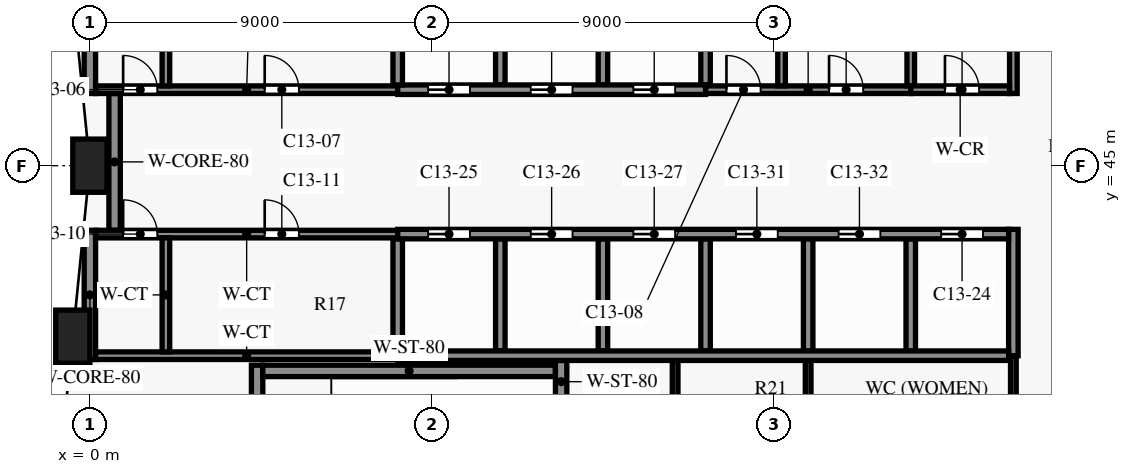
"""IFC4 building model, lengths in metres.
Left out: names, types, materials, properties, quantities, classifications, styles, units other than length and angle.
Written with IfcOpenShell. Run it as: python <this file> out.ifc"""

import sys

from ifc_helpers import new_model, si_unit, direction, frame, frame_2d, origin, origin_2d, place, context, subcontext, project, spatial, rectangle, extrude, element, fill, save


model = new_model("IFC4")
c1 = context("Model", 3, precision=1e-05, world=origin(), true_north=direction((0.0, 1.0)))
c2 = subcontext(c1, "Body", "Model", "MODEL_VIEW")
j1 = project(units=[si_unit("LENGTHUNIT", "METRE"), si_unit("PLANEANGLEUNIT", "RADIAN")], contexts=[c1])
p1 = place(None, origin())
s1 = spatial("IfcSite", under=j1, at=p1, CompositionType="ELEMENT")
p2 = place(p1, origin())
s2 = spatial("IfcBuilding", under=s1, at=p2, CompositionType="ELEMENT")
p3 = place(p2, frame((0.0, 0.0, 84.3)))
s3 = spatial("IfcBuildingStorey", under=s2, at=p3, CompositionType="ELEMENT", Elevation=84.3)
for number, where, z_axis, x_axis in (
    (1, (0.0, 45.0, 0.0), (0.0, 0.0, 1.0), (0.0, -1.0, 0.0)),
    (2, (-0.45, 40.5, 0.0), (0.0, 0.0, 1.0), (-0.1, -0.995, 0.0)),
):
    element("IfcColumn", number, at=place(p3, frame(where, z_axis=z_axis, x_axis=x_axis)), inside=s3, PredefinedType="COLUMN", context=c2, shape_type="SweptSolid", body=[
        extrude(rectangle(XDim=0.9, YDim=1.4, at=origin_2d()), origin(), (0.0, 0.0, 1.0), 4.2),
    ])
p4 = place(p3, frame((4.55, 39.6, 0.0), z_axis=(0.0, 0.0, 1.0), x_axis=(1.0, 0.0, 0.0)))
e3 = element("IfcWall", 3, at=p4, inside=s3, PredefinedType="SHEAR", context=c2, shape_type="SweptSolid", body=[
    extrude(rectangle(XDim=7.7, YDim=0.3, at=frame_2d((3.85, 0.0))), origin(), (0.0, 0.0, 1.0), 3.9),
])
p5 = place(p3, frame((0.15, 40.0, 0.0), z_axis=(0.0, 0.0, 1.0), x_axis=(1.0, 0.0, 0.0)))
e4 = element("IfcWall", 4, at=p5, inside=s3, PredefinedType="PARTITIONING", context=c2, shape_type="SweptSolid", body=[
    extrude(rectangle(XDim=7.95, YDim=0.2, at=frame_2d((3.975, 0.0))), origin(), (0.0, 0.0, 1.0), 3.9),
])
p6 = place(p3, frame((8.1, 40.0, 0.0), z_axis=(0.0, 0.0, 1.0), x_axis=(1.0, 0.0, 0.0)))
e5 = element("IfcWall", 5, at=p6, inside=s3, PredefinedType="SHEAR", context=c2, shape_type="SweptSolid", body=[
    extrude(rectangle(XDim=16.075, YDim=0.25, at=frame_2d((8.038, 0.0))), origin(), (0.0, 0.0, 1.0), 3.9),
])
p7 = place(p3, frame((0.15, 43.2, 0.0), z_axis=(0.0, 0.0, 1.0), x_axis=(1.0, 0.0, 0.0)))
e6 = element("IfcWall", 6, at=p7, inside=s3, PredefinedType="PARTITIONING", context=c2, shape_type="SweptSolid", body=[
    extrude(rectangle(XDim=7.95, YDim=0.2, at=frame_2d((3.975, 0.0))), origin(), (0.0, 0.0, 1.0), 3.9),
])
p8 = place(p7, frame((0.725, 0.0, 0.0)))
e7 = element("IfcOpeningElement", 7, at=p8, cuts=e6, PredefinedType="OPENING", context=c2, shape_type="SweptSolid", body=[
    extrude(rectangle(XDim=0.9, YDim=2.1, at=frame_2d((0.45, 1.05))), frame((0.0, 0.11, 0.0), z_axis=(0.0, -1.0, 0.0), x_axis=(1.0, 0.0, 0.0)), (0.0, 0.0, 1.0), 0.22),
])
p9 = place(p7, frame((4.45, 0.0, 0.0)))
e8 = element("IfcOpeningElement", 8, at=p9, cuts=e6, PredefinedType="OPENING", context=c2, shape_type="SweptSolid", body=[
    extrude(rectangle(XDim=0.9, YDim=2.1, at=frame_2d((0.45, 1.05))), frame((0.0, 0.11, 0.0), z_axis=(0.0, -1.0, 0.0), x_axis=(1.0, 0.0, 0.0)), (0.0, 0.0, 1.0), 0.22),
])
p10 = place(p3, frame((8.1, 43.2, 0.0), z_axis=(0.0, 0.0, 1.0), x_axis=(1.0, 0.0, 0.0)))
e9 = element("IfcWall", 9, at=p10, inside=s3, PredefinedType="SHEAR", context=c2, shape_type="SweptSolid", body=[
    extrude(rectangle(XDim=16.075, YDim=0.25, at=frame_2d((8.038, 0.0))), origin(), (0.0, 0.0, 1.0), 3.9),
])
p11 = place(p10, frame((14.3, 0.0, 0.0)))
e10 = element("IfcOpeningElement", 10, at=p11, cuts=e9, PredefinedType="OPENING", context=c2, shape_type="SweptSolid", body=[
    extrude(rectangle(XDim=1.1, YDim=2.1, at=frame_2d((0.55, 1.05))), frame((0.0, 0.135, 0.0), z_axis=(0.0, -1.0, 0.0), x_axis=(1.0, 0.0, 0.0)), (0.0, 0.0, 1.0), 0.27),
])
p12 = place(p10, frame((0.8, 0.0, 0.0)))
e11 = element("IfcOpeningElement", 11, at=p12, cuts=e9, PredefinedType="OPENING", context=c2, shape_type="SweptSolid", body=[
    extrude(rectangle(XDim=1.1, YDim=2.1, at=frame_2d((0.55, 1.05))), frame((0.0, 0.135, 0.0), z_axis=(0.0, -1.0, 0.0), x_axis=(1.0, 0.0, 0.0)), (0.0, 0.0, 1.0), 0.27),
])
p13 = place(p10, frame((3.5, 0.0, 0.0)))
e12 = element("IfcOpeningElement", 12, at=p13, cuts=e9, PredefinedType="OPENING", context=c2, shape_type="SweptSolid", body=[
    extrude(rectangle(XDim=1.1, YDim=2.1, at=frame_2d((0.55, 1.05))), frame((0.0, 0.135, 0.0), z_axis=(0.0, -1.0, 0.0), x_axis=(1.0, 0.0, 0.0)), (0.0, 0.0, 1.0), 0.27),
])
p14 = place(p10, frame((6.2, 0.0, 0.0)))
e13 = element("IfcOpeningElement", 13, at=p14, cuts=e9, PredefinedType="OPENING", context=c2, shape_type="SweptSolid", body=[
    extrude(rectangle(XDim=1.1, YDim=2.1, at=frame_2d((0.55, 1.05))), frame((0.0, 0.135, 0.0), z_axis=(0.0, -1.0, 0.0), x_axis=(1.0, 0.0, 0.0)), (0.0, 0.0, 1.0), 0.27),
])
p15 = place(p10, frame((8.9, 0.0, 0.0)))
e14 = element("IfcOpeningElement", 14, at=p15, cuts=e9, PredefinedType="OPENING", context=c2, shape_type="SweptSolid", body=[
    extrude(rectangle(XDim=1.1, YDim=2.1, at=frame_2d((0.55, 1.05))), frame((0.0, 0.135, 0.0), z_axis=(0.0, -1.0, 0.0), x_axis=(1.0, 0.0, 0.0)), (0.0, 0.0, 1.0), 0.27),
])
p16 = place(p10, frame((11.6, 0.0, 0.0)))
e15 = element("IfcOpeningElement", 15, at=p16, cuts=e9, PredefinedType="OPENING", context=c2, shape_type="SweptSolid", body=[
    extrude(rectangle(XDim=1.1, YDim=2.1, at=frame_2d((0.55, 1.05))), frame((0.0, 0.135, 0.0), z_axis=(0.0, -1.0, 0.0), x_axis=(1.0, 0.0, 0.0)), (0.0, 0.0, 1.0), 0.27),
])
p17 = place(p3, frame((0.15, 47.0, 0.0), z_axis=(0.0, 0.0, 1.0), x_axis=(1.0, 0.0, 0.0)))
e16 = element("IfcWall", 16, at=p17, inside=s3, PredefinedType="PARTITIONING", context=c2, shape_type="SweptSolid", body=[
    extrude(rectangle(XDim=7.95, YDim=0.2, at=frame_2d((3.975, 0.0))), origin(), (0.0, 0.0, 1.0), 3.9),
])
p18 = place(p17, frame((0.725, 0.0, 0.0)))
e17 = element("IfcOpeningElement", 17, at=p18, cuts=e16, PredefinedType="OPENING", context=c2, shape_type="SweptSolid", body=[
    extrude(rectangle(XDim=0.9, YDim=2.1, at=frame_2d((0.45, 1.05))), frame((0.0, 0.11, 0.0), z_axis=(0.0, -1.0, 0.0), x_axis=(1.0, 0.0, 0.0)), (0.0, 0.0, 1.0), 0.22),
])
p19 = place(p17, frame((4.45, 0.0, 0.0)))
e18 = element("IfcOpeningElement", 18, at=p19, cuts=e16, PredefinedType="OPENING", context=c2, shape_type="SweptSolid", body=[
    extrude(rectangle(XDim=0.9, YDim=2.1, at=frame_2d((0.45, 1.05))), frame((0.0, 0.11, 0.0), z_axis=(0.0, -1.0, 0.0), x_axis=(1.0, 0.0, 0.0)), (0.0, 0.0, 1.0), 0.22),
])
p20 = place(p3, frame((16.2, 47.0, 0.0), z_axis=(0.0, 0.0, 1.0), x_axis=(1.0, 0.0, 0.0)))
e19 = element("IfcWall", 19, at=p20, inside=s3, PredefinedType="PARTITIONING", context=c2, shape_type="SweptSolid", body=[
    extrude(rectangle(XDim=5.4, YDim=0.2, at=frame_2d((2.7, 0.0))), origin(), (0.0, 0.0, 1.0), 3.9),
])
p21 = place(p20, frame((0.55, 0.0, 0.0)))
e20 = element("IfcOpeningElement", 20, at=p21, cuts=e19, PredefinedType="OPENING", context=c2, shape_type="SweptSolid", body=[
    extrude(rectangle(XDim=0.9, YDim=2.1, at=frame_2d((0.45, 1.05))), frame((0.0, 0.11, 0.0), z_axis=(0.0, -1.0, 0.0), x_axis=(1.0, 0.0, 0.0)), (0.0, 0.0, 1.0), 0.22),
])
p22 = place(p20, frame((3.25, 0.0, 0.0)))
e21 = element("IfcOpeningElement", 21, at=p22, cuts=e19, PredefinedType="OPENING", context=c2, shape_type="SweptSolid", body=[
    extrude(rectangle(XDim=0.9, YDim=2.1, at=frame_2d((0.45, 1.05))), frame((0.0, 0.11, 0.0), z_axis=(0.0, -1.0, 0.0), x_axis=(1.0, 0.0, 0.0)), (0.0, 0.0, 1.0), 0.22),
])
p23 = place(p3, frame((21.6, 47.0, 0.0), z_axis=(0.0, 0.0, 1.0), x_axis=(1.0, 0.0, 0.0)))
e22 = element("IfcWall", 22, at=p23, inside=s3, PredefinedType="PARTITIONING", context=c2, shape_type="SweptSolid", body=[
    extrude(rectangle(XDim=2.6, YDim=0.2, at=frame_2d((1.3, 0.0))), origin(), (0.0, 0.0, 1.0), 3.9),
])
p24 = place(p23, frame((0.9, 0.0, 0.0)))
e23 = element("IfcOpeningElement", 23, at=p24, cuts=e22, PredefinedType="OPENING", context=c2, shape_type="SweptSolid", body=[
    extrude(rectangle(XDim=0.9, YDim=2.1, at=frame_2d((0.45, 1.05))), frame((0.0, 0.11, 0.0), z_axis=(0.0, -1.0, 0.0), x_axis=(1.0, 0.0, 0.0)), (0.0, 0.0, 1.0), 0.22),
])
p25 = place(p3, frame((8.1, 47.0, 0.0), z_axis=(0.0, 0.0, 1.0), x_axis=(1.0, 0.0, 0.0)))
e24 = element("IfcWall", 24, at=p25, inside=s3, PredefinedType="SHEAR", context=c2, shape_type="SweptSolid", body=[
    extrude(rectangle(XDim=8.1, YDim=0.25, at=frame_2d((4.05, 0.0))), origin(), (0.0, 0.0, 1.0), 3.9),
])
p26 = place(p25, frame((0.8, 0.0, 0.0)))
e25 = element("IfcOpeningElement", 25, at=p26, cuts=e24, PredefinedType="OPENING", context=c2, shape_type="SweptSolid", body=[
    extrude(rectangle(XDim=1.1, YDim=2.1, at=frame_2d((0.55, 1.05))), frame((0.0, 0.135, 0.0), z_axis=(0.0, -1.0, 0.0), x_axis=(1.0, 0.0, 0.0)), (0.0, 0.0, 1.0), 0.27),
])
p27 = place(p25, frame((3.5, 0.0, 0.0)))
e26 = element("IfcOpeningElement", 26, at=p27, cuts=e24, PredefinedType="OPENING", context=c2, shape_type="SweptSolid", body=[
    extrude(rectangle(XDim=1.1, YDim=2.1, at=frame_2d((0.55, 1.05))), frame((0.0, 0.135, 0.0), z_axis=(0.0, -1.0, 0.0), x_axis=(1.0, 0.0, 0.0)), (0.0, 0.0, 1.0), 0.27),
])
p28 = place(p25, frame((6.2, 0.0, 0.0)))
e27 = element("IfcOpeningElement", 27, at=p28, cuts=e24, PredefinedType="OPENING", context=c2, shape_type="SweptSolid", body=[
    extrude(rectangle(XDim=1.1, YDim=2.1, at=frame_2d((0.55, 1.05))), frame((0.0, 0.135, 0.0), z_axis=(0.0, -1.0, 0.0), x_axis=(1.0, 0.0, 0.0)), (0.0, 0.0, 1.0), 0.27),
])
p29 = place(p3, frame((0.0, 39.9, 0.0), z_axis=(0.0, 0.0, 1.0), x_axis=(0.0, 1.0, 0.0)))
e28 = element("IfcWall", 28, at=p29, inside=s3, PredefinedType="SHEAR", context=c2, shape_type="SweptSolid", body=[
    extrude(rectangle(XDim=3.4, YDim=0.3, at=frame_2d((1.7, 0.0))), origin(), (0.0, 0.0, 1.0), 3.9),
])
p30 = place(p3, frame((0.0, 46.9, 0.0), z_axis=(0.0, 0.0, 1.0), x_axis=(0.0, 1.0, 0.0)))
e29 = element("IfcWall", 29, at=p30, inside=s3, PredefinedType="SHEAR", context=c2, shape_type="SweptSolid", body=[
    extrude(rectangle(XDim=3.45, YDim=0.3, at=frame_2d((1.725, 0.0))), origin(), (0.0, 0.0, 1.0), 3.9),
])
p31 = place(p3, frame((0.65, 43.3, 0.0), z_axis=(0.0, 0.0, 1.0), x_axis=(0.0, 1.0, 0.0)))
e30 = element("IfcWall", 30, at=p31, inside=s3, PredefinedType="SHEAR", context=c2, shape_type="SweptSolid", body=[
    extrude(rectangle(XDim=3.6, YDim=0.3, at=frame_2d((1.8, 0.0))), origin(), (0.0, 0.0, 1.0), 3.9),
])
for number, where, z_axis, x_axis in (
    (31, (2.0, 40.1, 0.0), (0.0, 0.0, 1.0), (0.0, 1.0, 0.0)),
    (32, (2.0, 47.1, 0.0), (0.0, 0.0, 1.0), (0.0, 1.0, 0.0)),
):
    element("IfcWall", number, at=place(p3, frame(where, z_axis=z_axis, x_axis=x_axis)), inside=s3, PredefinedType="PARTITIONING", context=c2, shape_type="SweptSolid", body=[
        extrude(rectangle(XDim=3.0, YDim=0.2, at=frame_2d((1.5, 0.0))), origin(), (0.0, 0.0, 1.0), 3.9),
    ])
p32 = place(p3, frame((4.4, 35.85, 0.0), z_axis=(0.0, 0.0, 1.0), x_axis=(0.0, 1.0, 0.0)))
e33 = element("IfcWall", 33, at=p32, inside=s3, PredefinedType="SHEAR", context=c2, shape_type="SweptSolid", body=[
    extrude(rectangle(XDim=3.9, YDim=0.3, at=frame_2d((1.95, 0.0))), origin(), (0.0, 0.0, 1.0), 3.9),
])
for number, where, z_axis, x_axis in (
    (34, (8.1, 40.125, 0.0), (0.0, 0.0, 1.0), (0.0, 1.0, 0.0)),
    (35, (8.1, 47.125, 0.0), (0.0, 0.0, 1.0), (0.0, 1.0, 0.0)),
    (36, (10.8, 40.125, 0.0), (0.0, 0.0, 1.0), (0.0, 1.0, 0.0)),
    (37, (10.8, 47.125, 0.0), (0.0, 0.0, 1.0), (0.0, 1.0, 0.0)),
):
    element("IfcWall", number, at=place(p3, frame(where, z_axis=z_axis, x_axis=x_axis)), inside=s3, PredefinedType="SHEAR", context=c2, shape_type="SweptSolid", body=[
        extrude(rectangle(XDim=2.95, YDim=0.25, at=frame_2d((1.475, 0.0))), origin(), (0.0, 0.0, 1.0), 3.9),
    ])
p33 = place(p3, frame((12.4, 36.15, 0.0), z_axis=(0.0, 0.0, 1.0), x_axis=(0.0, 1.0, 0.0)))
e38 = element("IfcWall", 38, at=p33, inside=s3, PredefinedType="SHEAR", context=c2, shape_type="SweptSolid", body=[
    extrude(rectangle(XDim=3.725, YDim=0.3, at=frame_2d((1.863, 0.0))), origin(), (0.0, 0.0, 1.0), 3.9),
])
for number, where, z_axis, x_axis in (
    (39, (13.5, 40.125, 0.0), (0.0, 0.0, 1.0), (0.0, 1.0, 0.0)),
    (40, (13.5, 47.125, 0.0), (0.0, 0.0, 1.0), (0.0, 1.0, 0.0)),
):
    element("IfcWall", number, at=place(p3, frame(where, z_axis=z_axis, x_axis=x_axis)), inside=s3, PredefinedType="SHEAR", context=c2, shape_type="SweptSolid", body=[
        extrude(rectangle(XDim=2.95, YDim=0.25, at=frame_2d((1.475, 0.0))), origin(), (0.0, 0.0, 1.0), 3.9),
    ])
p34 = place(p3, frame((15.4, 36.075, 0.0), z_axis=(0.0, 0.0, 1.0), x_axis=(0.0, 1.0, 0.0)))
e41 = element("IfcWall", 41, at=p34, inside=s3, PredefinedType="PARTITIONING", context=c2, shape_type="SweptSolid", body=[
    extrude(rectangle(XDim=3.8, YDim=0.15, at=frame_2d((1.9, 0.0))), origin(), (0.0, 0.0, 1.0), 3.9),
])
p35 = place(p3, frame((16.2, 40.125, 0.0), z_axis=(0.0, 0.0, 1.0), x_axis=(0.0, 1.0, 0.0)))
e42 = element("IfcWall", 42, at=p35, inside=s3, PredefinedType="SHEAR", context=c2, shape_type="SweptSolid", body=[
    extrude(rectangle(XDim=2.95, YDim=0.25, at=frame_2d((1.475, 0.0))), origin(), (0.0, 0.0, 1.0), 3.9),
])
p36 = place(p3, frame((16.2, 47.125, 0.0), z_axis=(0.0, 0.0, 1.0), x_axis=(0.0, 1.0, 0.0)))
e43 = element("IfcWall", 43, at=p36, inside=s3, PredefinedType="SHEAR", context=c2, shape_type="SweptSolid", body=[
    extrude(rectangle(XDim=3.075, YDim=0.25, at=frame_2d((1.538, 0.0))), origin(), (0.0, 0.0, 1.0), 3.9),
])
p37 = place(p3, frame((18.2, 47.1, 0.0), z_axis=(0.0, 0.0, 1.0), x_axis=(0.0, 1.0, 0.0)))
e44 = element("IfcWall", 44, at=p37, inside=s3, PredefinedType="PARTITIONING", context=c2, shape_type="SweptSolid", body=[
    extrude(rectangle(XDim=4.6, YDim=0.2, at=frame_2d((2.3, 0.0))), origin(), (0.0, 0.0, 1.0), 3.9),
])
p38 = place(p3, frame((18.9, 36.075, 0.0), z_axis=(0.0, 0.0, 1.0), x_axis=(0.0, 1.0, 0.0)))
e45 = element("IfcWall", 45, at=p38, inside=s3, PredefinedType="PARTITIONING", context=c2, shape_type="SweptSolid", body=[
    extrude(rectangle(XDim=3.8, YDim=0.15, at=frame_2d((1.9, 0.0))), origin(), (0.0, 0.0, 1.0), 3.9),
])
p39 = place(p3, frame((18.9, 40.125, 0.0), z_axis=(0.0, 0.0, 1.0), x_axis=(0.0, 1.0, 0.0)))
e46 = element("IfcWall", 46, at=p39, inside=s3, PredefinedType="SHEAR", context=c2, shape_type="SweptSolid", body=[
    extrude(rectangle(XDim=2.95, YDim=0.25, at=frame_2d((1.475, 0.0))), origin(), (0.0, 0.0, 1.0), 3.9),
])
p40 = place(p3, frame((21.6, 47.1, 0.0), z_axis=(0.0, 0.0, 1.0), x_axis=(0.0, 1.0, 0.0)))
e47 = element("IfcWall", 47, at=p40, inside=s3, PredefinedType="PARTITIONING", context=c2, shape_type="SweptSolid", body=[
    extrude(rectangle(XDim=4.6, YDim=0.2, at=frame_2d((2.3, 0.0))), origin(), (0.0, 0.0, 1.0), 3.9),
])
p41 = place(p3, frame((21.6, 40.125, 0.0), z_axis=(0.0, 0.0, 1.0), x_axis=(0.0, 1.0, 0.0)))
e48 = element("IfcWall", 48, at=p41, inside=s3, PredefinedType="SHEAR", context=c2, shape_type="SweptSolid", body=[
    extrude(rectangle(XDim=2.95, YDim=0.25, at=frame_2d((1.475, 0.0))), origin(), (0.0, 0.0, 1.0), 3.9),
])
p42 = place(p3, frame((24.3, 35.925, 0.0), z_axis=(0.0, 0.0, 1.0), x_axis=(0.0, 1.0, 0.0)))
e49 = element("IfcWall", 49, at=p42, inside=s3, PredefinedType="SHEAR", context=c2, shape_type="SweptSolid", body=[
    extrude(rectangle(XDim=4.075, YDim=0.15, at=frame_2d((2.038, 0.0))), origin(), (0.0, 0.0, 1.0), 3.9),
])
p43 = place(p3, frame((24.3, 46.9, 0.0), z_axis=(0.0, 0.0, 1.0), x_axis=(0.0, 1.0, 0.0)))
e50 = element("IfcWall", 50, at=p43, inside=s3, PredefinedType="SHEAR", context=c2, shape_type="SweptSolid", body=[
    extrude(rectangle(XDim=5.0, YDim=0.2, at=frame_2d((2.5, 0.0))), origin(), (0.0, 0.0, 1.0), 3.9),
])
p44 = place(p3, frame((24.3, 40.0, 0.0), z_axis=(0.0, 0.0, 1.0), x_axis=(0.0, 1.0, 0.0)))
e51 = element("IfcWall", 51, at=p44, inside=s3, PredefinedType="SHEAR", context=c2, shape_type="SweptSolid", body=[
    extrude(rectangle(XDim=3.325, YDim=0.25, at=frame_2d((1.663, 0.0))), origin(), (0.0, 0.0, 1.0), 3.9),
])
p45 = place(p24, origin())
e52 = element("IfcDoor", 52, at=p45, inside=s3, OperationType="SINGLE_SWING_LEFT", PredefinedType="DOOR", context=c2, shape_type="SweptSolid", body=[
    extrude(rectangle(XDim=0.9, YDim=2.1, at=frame_2d((0.45, 1.05))), frame((0.0, 0.025, 0.0), z_axis=(0.0, -1.0, 0.0), x_axis=(1.0, 0.0, 0.0)), (0.0, 0.0, 1.0), 0.05),
])
fill(e23, e52)
p46 = place(p18, origin())
e53 = element("IfcDoor", 53, at=p46, inside=s3, OperationType="SINGLE_SWING_RIGHT", PredefinedType="DOOR", context=c2, shape_type="SweptSolid", body=[
    extrude(rectangle(XDim=0.9, YDim=2.1, at=frame_2d((0.45, 1.05))), frame((0.0, 0.025, 0.0), z_axis=(0.0, -1.0, 0.0), x_axis=(1.0, 0.0, 0.0)), (0.0, 0.0, 1.0), 0.05),
])
fill(e17, e53)
p47 = place(p19, origin())
e54 = element("IfcDoor", 54, at=p47, inside=s3, OperationType="SINGLE_SWING_LEFT", PredefinedType="DOOR", context=c2, shape_type="SweptSolid", body=[
    extrude(rectangle(XDim=0.9, YDim=2.1, at=frame_2d((0.45, 1.05))), frame((0.0, 0.025, 0.0), z_axis=(0.0, -1.0, 0.0), x_axis=(1.0, 0.0, 0.0)), (0.0, 0.0, 1.0), 0.05),
])
fill(e18, e54)
p48 = place(p21, origin())
e55 = element("IfcDoor", 55, at=p48, inside=s3, OperationType="SINGLE_SWING_LEFT", PredefinedType="DOOR", context=c2, shape_type="SweptSolid", body=[
    extrude(rectangle(XDim=0.9, YDim=2.1, at=frame_2d((0.45, 1.05))), frame((0.0, 0.025, 0.0), z_axis=(0.0, -1.0, 0.0), x_axis=(1.0, 0.0, 0.0)), (0.0, 0.0, 1.0), 0.05),
])
fill(e20, e55)
p49 = place(p22, origin())
e56 = element("IfcDoor", 56, at=p49, inside=s3, OperationType="SINGLE_SWING_RIGHT", PredefinedType="DOOR", context=c2, shape_type="SweptSolid", body=[
    extrude(rectangle(XDim=0.9, YDim=2.1, at=frame_2d((0.45, 1.05))), frame((0.0, 0.025, 0.0), z_axis=(0.0, -1.0, 0.0), x_axis=(1.0, 0.0, 0.0)), (0.0, 0.0, 1.0), 0.05),
])
fill(e21, e56)
p50 = place(p8, origin())
e57 = element("IfcDoor", 57, at=p50, inside=s3, OperationType="SINGLE_SWING_LEFT", PredefinedType="DOOR", context=c2, shape_type="SweptSolid", body=[
    extrude(rectangle(XDim=0.9, YDim=2.1, at=frame_2d((0.45, 1.05))), frame((0.0, 0.025, 0.0), z_axis=(0.0, -1.0, 0.0), x_axis=(1.0, 0.0, 0.0)), (0.0, 0.0, 1.0), 0.05),
])
fill(e7, e57)
p51 = place(p9, origin())
e58 = element("IfcDoor", 58, at=p51, inside=s3, OperationType="SINGLE_SWING_RIGHT", PredefinedType="DOOR", context=c2, shape_type="SweptSolid", body=[
    extrude(rectangle(XDim=0.9, YDim=2.1, at=frame_2d((0.45, 1.05))), frame((0.0, 0.025, 0.0), z_axis=(0.0, -1.0, 0.0), x_axis=(1.0, 0.0, 0.0)), (0.0, 0.0, 1.0), 0.05),
])
fill(e8, e58)
p52 = place(p11, origin())
e59 = element("IfcDoor", 59, at=p52, inside=s3, OperationType="DOUBLE_DOOR_SLIDING", PredefinedType="DOOR", context=c2, shape_type="SweptSolid", body=[
    extrude(rectangle(XDim=1.1, YDim=2.1, at=frame_2d((0.55, 1.05))), frame((0.0, 0.025, 0.0), z_axis=(0.0, -1.0, 0.0), x_axis=(1.0, 0.0, 0.0)), (0.0, 0.0, 1.0), 0.05),
])
fill(e10, e59)
p53 = place(p12, origin())
e60 = element("IfcDoor", 60, at=p53, inside=s3, OperationType="DOUBLE_DOOR_SLIDING", PredefinedType="DOOR", context=c2, shape_type="SweptSolid", body=[
    extrude(rectangle(XDim=1.1, YDim=2.1, at=frame_2d((0.55, 1.05))), frame((0.0, 0.025, 0.0), z_axis=(0.0, -1.0, 0.0), x_axis=(1.0, 0.0, 0.0)), (0.0, 0.0, 1.0), 0.05),
])
fill(e11, e60)
p54 = place(p13, origin())
e61 = element("IfcDoor", 61, at=p54, inside=s3, OperationType="DOUBLE_DOOR_SLIDING", PredefinedType="DOOR", context=c2, shape_type="SweptSolid", body=[
    extrude(rectangle(XDim=1.1, YDim=2.1, at=frame_2d((0.55, 1.05))), frame((0.0, 0.025, 0.0), z_axis=(0.0, -1.0, 0.0), x_axis=(1.0, 0.0, 0.0)), (0.0, 0.0, 1.0), 0.05),
])
fill(e12, e61)
p55 = place(p14, origin())
e62 = element("IfcDoor", 62, at=p55, inside=s3, OperationType="DOUBLE_DOOR_SLIDING", PredefinedType="DOOR", context=c2, shape_type="SweptSolid", body=[
    extrude(rectangle(XDim=1.1, YDim=2.1, at=frame_2d((0.55, 1.05))), frame((0.0, 0.025, 0.0), z_axis=(0.0, -1.0, 0.0), x_axis=(1.0, 0.0, 0.0)), (0.0, 0.0, 1.0), 0.05),
])
fill(e13, e62)
p56 = place(p26, origin())
e63 = element("IfcDoor", 63, at=p56, inside=s3, OperationType="DOUBLE_DOOR_SLIDING", PredefinedType="DOOR", context=c2, shape_type="SweptSolid", body=[
    extrude(rectangle(XDim=1.1, YDim=2.1, at=frame_2d((0.55, 1.05))), frame((0.0, 0.025, 0.0), z_axis=(0.0, -1.0, 0.0), x_axis=(1.0, 0.0, 0.0)), (0.0, 0.0, 1.0), 0.05),
])
fill(e25, e63)
p57 = place(p27, origin())
e64 = element("IfcDoor", 64, at=p57, inside=s3, OperationType="DOUBLE_DOOR_SLIDING", PredefinedType="DOOR", context=c2, shape_type="SweptSolid", body=[
    extrude(rectangle(XDim=1.1, YDim=2.1, at=frame_2d((0.55, 1.05))), frame((0.0, 0.025, 0.0), z_axis=(0.0, -1.0, 0.0), x_axis=(1.0, 0.0, 0.0)), (0.0, 0.0, 1.0), 0.05),
])
fill(e26, e64)
p58 = place(p28, origin())
e65 = element("IfcDoor", 65, at=p58, inside=s3, OperationType="DOUBLE_DOOR_SLIDING", PredefinedType="DOOR", context=c2, shape_type="SweptSolid", body=[
    extrude(rectangle(XDim=1.1, YDim=2.1, at=frame_2d((0.55, 1.05))), frame((0.0, 0.025, 0.0), z_axis=(0.0, -1.0, 0.0), x_axis=(1.0, 0.0, 0.0)), (0.0, 0.0, 1.0), 0.05),
])
fill(e27, e65)
p59 = place(p15, origin())
e66 = element("IfcDoor", 66, at=p59, inside=s3, OperationType="DOUBLE_DOOR_SLIDING", PredefinedType="DOOR", context=c2, shape_type="SweptSolid", body=[
    extrude(rectangle(XDim=1.1, YDim=2.1, at=frame_2d((0.55, 1.05))), frame((0.0, 0.025, 0.0), z_axis=(0.0, -1.0, 0.0), x_axis=(1.0, 0.0, 0.0)), (0.0, 0.0, 1.0), 0.05),
])
fill(e14, e66)
p60 = place(p16, origin())
e67 = element("IfcDoor", 67, at=p60, inside=s3, OperationType="DOUBLE_DOOR_SLIDING", PredefinedType="DOOR", context=c2, shape_type="SweptSolid", body=[
    extrude(rectangle(XDim=1.1, YDim=2.1, at=frame_2d((0.55, 1.05))), frame((0.0, 0.025, 0.0), z_axis=(0.0, -1.0, 0.0), x_axis=(1.0, 0.0, 0.0)), (0.0, 0.0, 1.0), 0.05),
])
fill(e15, e67)
save(model, sys.argv[1])
